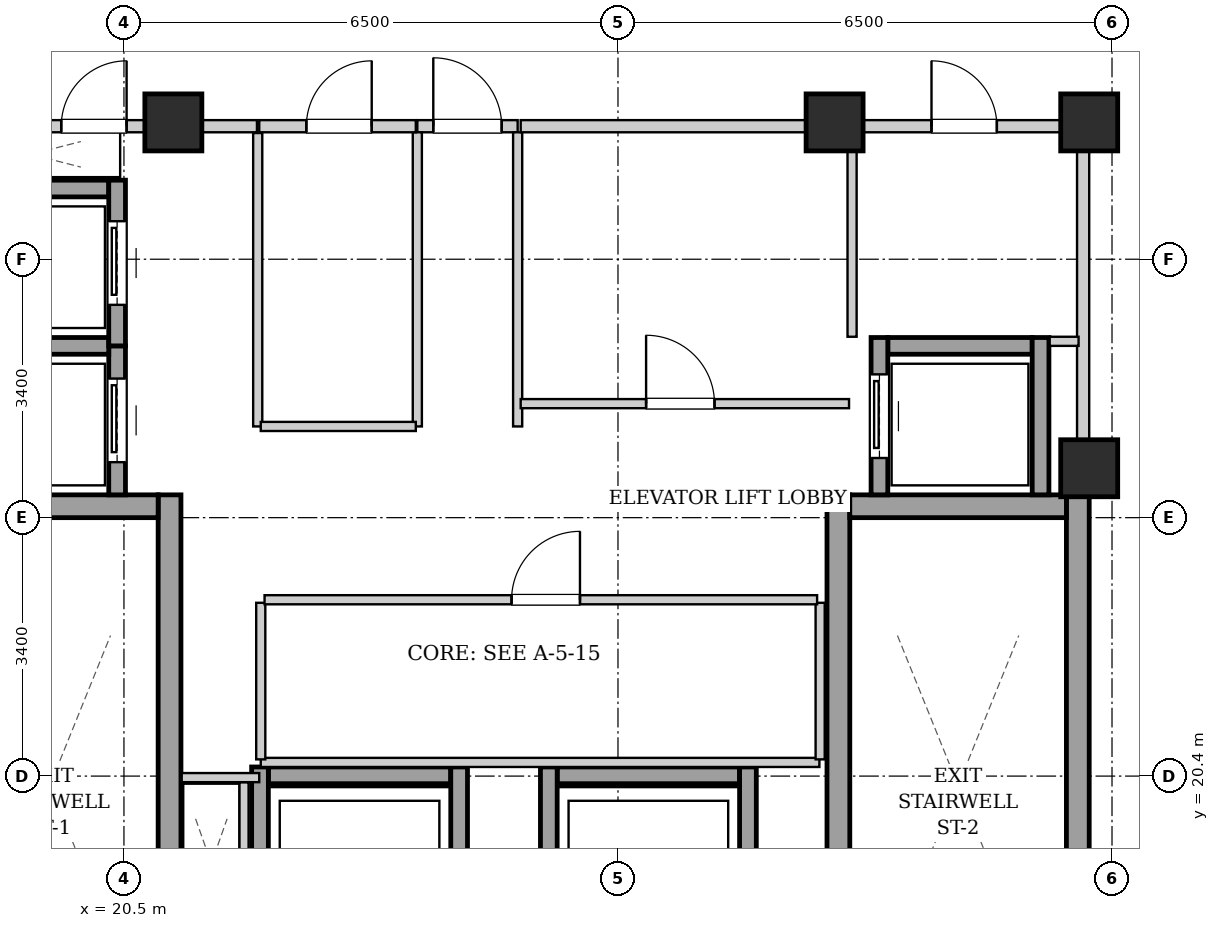
"""IFC4 building model, lengths in metres.
Left out: names, types, materials, properties, quantities, classifications, styles, units other than length and angle.
Written with IfcOpenShell. Run it as: python <this file> out.ifc"""

import sys

from ifc_helpers import new_model, si_unit, direction, frame, frame_2d, origin, origin_2d, place, context, subcontext, project, spatial, rectangle, extrude, element, fill, save


model = new_model("IFC4")
c1 = context("Model", 3, precision=1e-05, world=origin(), true_north=direction((0.0, 1.0)))
c2 = subcontext(c1, "Body", "Model", "MODEL_VIEW")
j1 = project(units=[si_unit("LENGTHUNIT", "METRE"), si_unit("PLANEANGLEUNIT", "RADIAN")], contexts=[c1])
p1 = place(None, origin())
s1 = spatial("IfcSite", under=j1, at=p1, CompositionType="ELEMENT")
p2 = place(p1, origin())
s2 = spatial("IfcBuilding", under=s1, at=p2, CompositionType="ELEMENT")
p3 = place(p2, frame((0.0, 0.0, 244.5)))
s3 = spatial("IfcBuildingStorey", under=s2, at=p3, CompositionType="ELEMENT", Elevation=244.5)
for number, where, z_axis, x_axis in (
    (1, (21.15, 29.0, 0.0), (0.0, 0.0, 1.0), (1.0, 0.0, 0.0)),
    (2, (29.85, 29.0, 0.0), (0.0, 0.0, 1.0), (1.0, 0.0, 0.0)),
    (3, (33.2, 29.0, 0.0), (0.0, 0.0, 1.0), (1.0, 0.0, 0.0)),
    (4, (33.2, 24.45, 0.0), (0.0, 0.0, 1.0), (1.0, 0.0, 0.0)),
):
    element("IfcColumn", number, at=place(p3, frame(where, z_axis=z_axis, x_axis=x_axis)), inside=s3, PredefinedType="COLUMN", context=c2, shape_type="SweptSolid", body=[
        extrude(rectangle(XDim=0.75, YDim=0.75, at=origin_2d()), origin(), (0.0, 0.0, 1.0), 3.4),
    ])
p4 = place(p3, frame((21.1, 15.1, 0.0), z_axis=(0.0, 0.0, 1.0), x_axis=(0.0, 1.0, 0.0)))
e5 = element("IfcWall", 5, at=p4, inside=s3, PredefinedType="SHEAR", context=c2, shape_type="SweptSolid", body=[
    extrude(rectangle(XDim=9.0, YDim=0.3, at=frame_2d((4.5, 0.0))), origin(), (0.0, 0.0, 1.0), 3.14),
])
p5 = place(p3, frame((18.1, 23.95, 0.0), z_axis=(0.0, 0.0, 1.0), x_axis=(1.0, 0.0, 0.0)))
e6 = element("IfcWall", 6, at=p5, inside=s3, PredefinedType="SHEAR", context=c2, shape_type="SweptSolid", body=[
    extrude(rectangle(XDim=2.85, YDim=0.3, at=frame_2d((1.425, 0.0))), origin(), (0.0, 0.0, 1.0), 3.14),
])
for number, where, z_axis, x_axis in (
    (7, (29.9, 15.1, 0.0), (0.0, 0.0, 1.0), (0.0, 1.0, 0.0)),
    (8, (33.05, 15.1, 0.0), (0.0, 0.0, 1.0), (0.0, 1.0, 0.0)),
):
    element("IfcWall", number, at=place(p3, frame(where, z_axis=z_axis, x_axis=x_axis)), inside=s3, PredefinedType="SHEAR", context=c2, shape_type="SweptSolid", body=[
        extrude(rectangle(XDim=9.0, YDim=0.3, at=frame_2d((4.5, 0.0))), origin(), (0.0, 0.0, 1.0), 3.14),
    ])
p6 = place(p3, frame((30.05, 23.95, 0.0), z_axis=(0.0, 0.0, 1.0), x_axis=(1.0, 0.0, 0.0)))
e9 = element("IfcWall", 9, at=p6, inside=s3, PredefinedType="SHEAR", context=c2, shape_type="SweptSolid", body=[
    extrude(rectangle(XDim=2.85, YDim=0.3, at=frame_2d((1.425, 0.0))), origin(), (0.0, 0.0, 1.0), 3.14),
])
p7 = place(p3, frame((20.41, 24.1, 0.0), z_axis=(0.0, 0.0, 1.0), x_axis=(0.0, 1.0, 0.0)))
e10 = element("IfcWall", 10, at=p7, inside=s3, PredefinedType="SHEAR", context=c2, shape_type="SweptSolid", body=[
    extrude(rectangle(XDim=1.96, YDim=0.22, at=frame_2d((0.98, 0.0))), origin(), (0.0, 0.0, 1.0), 3.14),
])
p8 = place(p7, frame((0.43, 0.0, 0.0)))
e11 = element("IfcOpeningElement", 11, at=p8, cuts=e10, PredefinedType="OPENING", context=c2, shape_type="SweptSolid", body=[
    extrude(rectangle(XDim=1.1, YDim=2.15, at=frame_2d((0.55, 1.075))), frame((0.0, 0.12, 0.0), z_axis=(0.0, -1.0, 0.0), x_axis=(1.0, 0.0, 0.0)), (0.0, 0.0, 1.0), 0.24),
])
for number, where, z_axis, x_axis in (
    (12, (18.4, 26.06, 0.0), (0.0, 0.0, 1.0), (1.0, 0.0, 0.0)),
    (13, (18.4, 28.13, 0.0), (0.0, 0.0, 1.0), (1.0, 0.0, 0.0)),
):
    element("IfcWall", number, at=place(p3, frame(where, z_axis=z_axis, x_axis=x_axis)), inside=s3, PredefinedType="SHEAR", context=c2, shape_type="SweptSolid", body=[
        extrude(rectangle(XDim=1.9, YDim=0.22, at=frame_2d((0.95, 0.0))), origin(), (0.0, 0.0, 1.0), 3.14),
    ])
p9 = place(p3, frame((20.41, 26.06, 0.0), z_axis=(0.0, 0.0, 1.0), x_axis=(0.0, 1.0, 0.0)))
e14 = element("IfcWall", 14, at=p9, inside=s3, PredefinedType="SHEAR", context=c2, shape_type="SweptSolid", body=[
    extrude(rectangle(XDim=2.18, YDim=0.22, at=frame_2d((1.09, 0.0))), origin(), (0.0, 0.0, 1.0), 3.14),
])
p10 = place(p9, frame((0.54, 0.0, 0.0)))
e15 = element("IfcOpeningElement", 15, at=p10, cuts=e14, PredefinedType="OPENING", context=c2, shape_type="SweptSolid", body=[
    extrude(rectangle(XDim=1.1, YDim=2.15, at=frame_2d((0.55, 1.075))), frame((0.0, 0.12, 0.0), z_axis=(0.0, -1.0, 0.0), x_axis=(1.0, 0.0, 0.0)), (0.0, 0.0, 1.0), 0.24),
])
p11 = place(p3, frame((30.55, 26.06, 0.0), z_axis=(0.0, 0.0, 1.0), x_axis=(1.0, 0.0, 0.0)))
e16 = element("IfcWall", 16, at=p11, inside=s3, PredefinedType="SHEAR", context=c2, shape_type="SweptSolid", body=[
    extrude(rectangle(XDim=1.9, YDim=0.22, at=frame_2d((0.95, 0.0))), origin(), (0.0, 0.0, 1.0), 3.14),
])
p12 = place(p3, frame((30.44, 24.1, 0.0), z_axis=(0.0, 0.0, 1.0), x_axis=(0.0, 1.0, 0.0)))
e17 = element("IfcWall", 17, at=p12, inside=s3, PredefinedType="SHEAR", context=c2, shape_type="SweptSolid", body=[
    extrude(rectangle(XDim=2.07, YDim=0.22, at=frame_2d((1.035, 0.0))), origin(), (0.0, 0.0, 1.0), 3.14),
])
p13 = place(p12, frame((0.485, 0.0, 0.0)))
e18 = element("IfcOpeningElement", 18, at=p13, cuts=e17, PredefinedType="OPENING", context=c2, shape_type="SweptSolid", body=[
    extrude(rectangle(XDim=1.1, YDim=2.15, at=frame_2d((0.55, 1.075))), frame((0.0, 0.12, 0.0), z_axis=(0.0, -1.0, 0.0), x_axis=(1.0, 0.0, 0.0)), (0.0, 0.0, 1.0), 0.24),
])
p14 = place(p3, frame((32.56, 24.1, 0.0), z_axis=(0.0, 0.0, 1.0), x_axis=(0.0, 1.0, 0.0)))
e19 = element("IfcWall", 19, at=p14, inside=s3, PredefinedType="SHEAR", context=c2, shape_type="SweptSolid", body=[
    extrude(rectangle(XDim=2.07, YDim=0.22, at=frame_2d((1.035, 0.0))), origin(), (0.0, 0.0, 1.0), 3.14),
])
p15 = place(p3, frame((22.4, 20.41, 0.0), z_axis=(0.0, 0.0, 1.0), x_axis=(1.0, 0.0, 0.0)))
e20 = element("IfcWall", 20, at=p15, inside=s3, PredefinedType="SHEAR", context=c2, shape_type="SweptSolid", body=[
    extrude(rectangle(XDim=2.4, YDim=0.22, at=frame_2d((1.2, 0.0))), origin(), (0.0, 0.0, 1.0), 3.14),
])
for number, where, z_axis, x_axis in (
    (21, (22.29, 17.98, 0.0), (0.0, 0.0, 1.0), (0.0, 1.0, 0.0)),
    (22, (24.91, 17.98, 0.0), (0.0, 0.0, 1.0), (0.0, 1.0, 0.0)),
):
    element("IfcWall", number, at=place(p3, frame(where, z_axis=z_axis, x_axis=x_axis)), inside=s3, PredefinedType="SHEAR", context=c2, shape_type="SweptSolid", body=[
        extrude(rectangle(XDim=2.54, YDim=0.22, at=frame_2d((1.27, 0.0))), origin(), (0.0, 0.0, 1.0), 3.14),
    ])
p16 = place(p3, frame((26.2, 20.41, 0.0), z_axis=(0.0, 0.0, 1.0), x_axis=(1.0, 0.0, 0.0)))
e23 = element("IfcWall", 23, at=p16, inside=s3, PredefinedType="SHEAR", context=c2, shape_type="SweptSolid", body=[
    extrude(rectangle(XDim=2.4, YDim=0.22, at=frame_2d((1.2, 0.0))), origin(), (0.0, 0.0, 1.0), 3.14),
])
for number, where, z_axis, x_axis in (
    (24, (26.09, 17.98, 0.0), (0.0, 0.0, 1.0), (0.0, 1.0, 0.0)),
    (25, (28.71, 17.98, 0.0), (0.0, 0.0, 1.0), (0.0, 1.0, 0.0)),
):
    element("IfcWall", number, at=place(p3, frame(where, z_axis=z_axis, x_axis=x_axis)), inside=s3, PredefinedType="SHEAR", context=c2, shape_type="SweptSolid", body=[
        extrude(rectangle(XDim=2.54, YDim=0.22, at=frame_2d((1.27, 0.0))), origin(), (0.0, 0.0, 1.0), 3.14),
    ])
p17 = place(p3, frame((33.12, 24.12, 0.0), z_axis=(0.0, 0.0, 1.0), x_axis=(0.0, 1.0, 0.0)))
e26 = element("IfcWall", 26, at=p17, inside=s3, PredefinedType="PARTITIONING", context=c2, shape_type="SweptSolid", body=[
    extrude(rectangle(XDim=4.76, YDim=0.16, at=frame_2d((2.38, 0.0))), origin(), (0.0, 0.0, 1.0), 3.14),
])
p18 = place(p3, frame((24.36, 28.95, 0.0), z_axis=(0.0, 0.0, 1.0), x_axis=(1.0, 0.0, 0.0)))
e27 = element("IfcWall", 27, at=p18, inside=s3, PredefinedType="PARTITIONING", context=c2, shape_type="SweptSolid", body=[
    extrude(rectangle(XDim=1.32, YDim=0.16, at=frame_2d((0.66, 0.0))), origin(), (0.0, 0.0, 1.0), 2.668),
])
p19 = place(p18, frame((0.21, 0.0, 0.0)))
e28 = element("IfcOpeningElement", 28, at=p19, cuts=e27, PredefinedType="OPENING", context=c2, shape_type="SweptSolid", body=[
    extrude(rectangle(XDim=0.9, YDim=2.05, at=frame_2d((0.45, 1.025))), frame((0.0, 0.09, 0.0), z_axis=(0.0, -1.0, 0.0), x_axis=(1.0, 0.0, 0.0)), (0.0, 0.0, 1.0), 0.18),
])
p20 = place(p3, frame((17.96, 28.95, 0.0), z_axis=(0.0, 0.0, 1.0), x_axis=(1.0, 0.0, 0.0)))
e29 = element("IfcWall", 29, at=p20, inside=s3, PredefinedType="PARTITIONING", context=c2, shape_type="SweptSolid", body=[
    extrude(rectangle(XDim=4.29, YDim=0.16, at=frame_2d((2.145, 0.0))), origin(), (0.0, 0.0, 1.0), 2.668),
])
p21 = place(p20, frame((1.715, 0.0, 0.0)))
e30 = element("IfcOpeningElement", 30, at=p21, cuts=e29, PredefinedType="OPENING", context=c2, shape_type="SweptSolid", body=[
    extrude(rectangle(XDim=0.86, YDim=2.05, at=frame_2d((0.43, 1.025))), frame((0.0, 0.09, 0.0), z_axis=(0.0, -1.0, 0.0), x_axis=(1.0, 0.0, 0.0)), (0.0, 0.0, 1.0), 0.18),
])
p22 = place(p3, frame((22.08, 18.2, 0.0), z_axis=(0.0, 0.0, 1.0), x_axis=(0.0, 1.0, 0.0)))
e31 = element("IfcWall", 31, at=p22, inside=s3, PredefinedType="PARTITIONING", context=c2, shape_type="SweptSolid", body=[
    extrude(rectangle(XDim=2.12, YDim=0.12, at=frame_2d((1.06, 0.0))), origin(), (0.0, 0.0, 1.0), 3.14),
])
p23 = place(p3, frame((22.28, 20.38, 0.0), z_axis=(0.0, 0.0, 1.0), x_axis=(-1.0, 0.0, 0.0)))
e32 = element("IfcWall", 32, at=p23, inside=s3, PredefinedType="PARTITIONING", context=c2, shape_type="SweptSolid", body=[
    extrude(rectangle(XDim=1.02, YDim=0.12, at=frame_2d((0.51, 0.0))), origin(), (0.0, 0.0, 1.0), 3.14),
])
for number, where, z_axis, x_axis in (
    (33, (24.36, 25.0, 0.0), (0.0, 0.0, 1.0), (0.0, 1.0, 0.0)),
    (34, (25.68, 25.0, 0.0), (0.0, 0.0, 1.0), (0.0, 1.0, 0.0)),
):
    element("IfcWall", number, at=place(p3, frame(where, z_axis=z_axis, x_axis=x_axis)), inside=s3, PredefinedType="PARTITIONING", context=c2, shape_type="SweptSolid", body=[
        extrude(rectangle(XDim=3.87, YDim=0.12, at=frame_2d((1.935, 0.0))), origin(), (0.0, 0.0, 1.0), 3.14),
    ])
p24 = place(p3, frame((30.08, 26.18, 0.0), z_axis=(0.0, 0.0, 1.0), x_axis=(0.0, 1.0, 0.0)))
e35 = element("IfcWall", 35, at=p24, inside=s3, PredefinedType="PARTITIONING", context=c2, shape_type="SweptSolid", body=[
    extrude(rectangle(XDim=2.68, YDim=0.12, at=frame_2d((1.34, 0.0))), origin(), (0.0, 0.0, 1.0), 3.14),
])
p25 = place(p3, frame((32.68, 26.12, 0.0), z_axis=(0.0, 0.0, 1.0), x_axis=(1.0, 0.0, 0.0)))
e36 = element("IfcWall", 36, at=p25, inside=s3, PredefinedType="PARTITIONING", context=c2, shape_type="SweptSolid", body=[
    extrude(rectangle(XDim=0.38, YDim=0.12, at=frame_2d((0.19, 0.0))), origin(), (0.0, 0.0, 1.0), 3.14),
])
p26 = place(p3, frame((30.08, 28.95, 0.0), z_axis=(0.0, 0.0, 1.0), x_axis=(1.0, 0.0, 0.0)))
e37 = element("IfcWall", 37, at=p26, inside=s3, PredefinedType="PARTITIONING", context=c2, shape_type="SweptSolid", body=[
    extrude(rectangle(XDim=2.96, YDim=0.16, at=frame_2d((1.48, 0.0))), origin(), (0.0, 0.0, 1.0), 3.14),
])
p27 = place(p26, frame((1.045, 0.0, 0.0)))
e38 = element("IfcOpeningElement", 38, at=p27, cuts=e37, PredefinedType="OPENING", context=c2, shape_type="SweptSolid", body=[
    extrude(rectangle(XDim=0.86, YDim=2.05, at=frame_2d((0.43, 1.025))), frame((0.0, 0.09, 0.0), z_axis=(0.0, -1.0, 0.0), x_axis=(1.0, 0.0, 0.0)), (0.0, 0.0, 1.0), 0.18),
])
p28 = place(p3, frame((22.26, 25.0, 0.0), z_axis=(0.0, 0.0, 1.0), x_axis=(0.0, 1.0, 0.0)))
e39 = element("IfcWall", 39, at=p28, inside=s3, PredefinedType="PARTITIONING", context=c2, shape_type="SweptSolid", body=[
    extrude(rectangle(XDim=3.86, YDim=0.12, at=frame_2d((1.93, 0.0))), origin(), (0.0, 0.0, 1.0), 3.14),
])
p29 = place(p3, frame((22.3, 25.0, 0.0), z_axis=(0.0, 0.0, 1.0), x_axis=(1.0, 0.0, 0.0)))
e40 = element("IfcWall", 40, at=p29, inside=s3, PredefinedType="PARTITIONING", context=c2, shape_type="SweptSolid", body=[
    extrude(rectangle(XDim=2.04, YDim=0.12, at=frame_2d((1.02, 0.0))), origin(), (0.0, 0.0, 1.0), 3.14),
])
p30 = place(p3, frame((22.28, 28.95, 0.0), z_axis=(0.0, 0.0, 1.0), x_axis=(1.0, 0.0, 0.0)))
e41 = element("IfcWall", 41, at=p30, inside=s3, PredefinedType="PARTITIONING", context=c2, shape_type="SweptSolid", body=[
    extrude(rectangle(XDim=2.06, YDim=0.16, at=frame_2d((1.03, 0.0))), origin(), (0.0, 0.0, 1.0), 2.668),
])
p31 = place(p30, frame((0.62, 0.0, 0.0)))
e42 = element("IfcOpeningElement", 42, at=p31, cuts=e41, PredefinedType="OPENING", context=c2, shape_type="SweptSolid", body=[
    extrude(rectangle(XDim=0.86, YDim=2.05, at=frame_2d((0.43, 1.025))), frame((0.0, 0.09, 0.0), z_axis=(0.0, -1.0, 0.0), x_axis=(1.0, 0.0, 0.0)), (0.0, 0.0, 1.0), 0.18),
])
p32 = place(p3, frame((25.72, 28.95, 0.0), z_axis=(0.0, 0.0, 1.0), x_axis=(1.0, 0.0, 0.0)))
e43 = element("IfcWall", 43, at=p32, inside=s3, PredefinedType="PARTITIONING", context=c2, shape_type="SweptSolid", body=[
    extrude(rectangle(XDim=4.32, YDim=0.16, at=frame_2d((2.16, 0.0))), origin(), (0.0, 0.0, 1.0), 2.668),
])
p33 = place(p3, frame((25.72, 25.3, 0.0), z_axis=(0.0, 0.0, 1.0), x_axis=(1.0, 0.0, 0.0)))
e44 = element("IfcWall", 44, at=p33, inside=s3, PredefinedType="PARTITIONING", context=c2, shape_type="SweptSolid", body=[
    extrude(rectangle(XDim=4.32, YDim=0.12, at=frame_2d((2.16, 0.0))), origin(), (0.0, 0.0, 1.0), 3.14),
])
p34 = place(p33, frame((1.65, 0.0, 0.0)))
e45 = element("IfcOpeningElement", 45, at=p34, cuts=e44, PredefinedType="OPENING", context=c2, shape_type="SweptSolid", body=[
    extrude(rectangle(XDim=0.9, YDim=2.05, at=frame_2d((0.45, 1.025))), frame((0.0, 0.07, 0.0), z_axis=(0.0, -1.0, 0.0), x_axis=(1.0, 0.0, 0.0)), (0.0, 0.0, 1.0), 0.14),
])
p35 = place(p3, frame((22.3, 20.58, 0.0), z_axis=(0.0, 0.0, 1.0), x_axis=(1.0, 0.0, 0.0)))
e46 = element("IfcWall", 46, at=p35, inside=s3, PredefinedType="PARTITIONING", context=c2, shape_type="SweptSolid", body=[
    extrude(rectangle(XDim=7.35, YDim=0.12, at=frame_2d((3.675, 0.0))), origin(), (0.0, 0.0, 1.0), 3.14),
])
for number, where, z_axis, x_axis in (
    (47, (22.3, 20.62, 0.0), (0.0, 0.0, 1.0), (0.0, 1.0, 0.0)),
    (48, (29.66, 20.62, 0.0), (0.0, 0.0, 1.0), (0.0, 1.0, 0.0)),
):
    element("IfcWall", number, at=place(p3, frame(where, z_axis=z_axis, x_axis=x_axis)), inside=s3, PredefinedType="PARTITIONING", context=c2, shape_type="SweptSolid", body=[
        extrude(rectangle(XDim=2.06, YDim=0.12, at=frame_2d((1.03, 0.0))), origin(), (0.0, 0.0, 1.0), 3.14),
    ])
p36 = place(p3, frame((22.35, 22.72, 0.0), z_axis=(0.0, 0.0, 1.0), x_axis=(1.0, 0.0, 0.0)))
e49 = element("IfcWall", 49, at=p36, inside=s3, PredefinedType="PARTITIONING", context=c2, shape_type="SweptSolid", body=[
    extrude(rectangle(XDim=7.27, YDim=0.12, at=frame_2d((3.635, 0.0))), origin(), (0.0, 0.0, 1.0), 3.14),
])
p37 = place(p36, frame((3.25, 0.0, 0.0)))
e50 = element("IfcOpeningElement", 50, at=p37, cuts=e49, PredefinedType="OPENING", context=c2, shape_type="SweptSolid", body=[
    extrude(rectangle(XDim=0.9, YDim=2.05, at=frame_2d((0.45, 1.025))), frame((0.0, 0.07, 0.0), z_axis=(0.0, -1.0, 0.0), x_axis=(1.0, 0.0, 0.0)), (0.0, 0.0, 1.0), 0.14),
])
p38 = place(p8, origin())
e51 = element("IfcDoor", 51, at=p38, inside=s3, OperationType="SLIDING_TO_LEFT", PredefinedType="DOOR", context=c2, shape_type="SweptSolid", body=[
    extrude(rectangle(XDim=1.1, YDim=2.15, at=frame_2d((0.55, 1.075))), frame((0.0, 0.025, 0.0), z_axis=(0.0, -1.0, 0.0), x_axis=(1.0, 0.0, 0.0)), (0.0, 0.0, 1.0), 0.05),
])
fill(e11, e51)
p39 = place(p10, origin())
e52 = element("IfcDoor", 52, at=p39, inside=s3, OperationType="SLIDING_TO_LEFT", PredefinedType="DOOR", context=c2, shape_type="SweptSolid", body=[
    extrude(rectangle(XDim=1.1, YDim=2.15, at=frame_2d((0.55, 1.075))), frame((0.0, 0.025, 0.0), z_axis=(0.0, -1.0, 0.0), x_axis=(1.0, 0.0, 0.0)), (0.0, 0.0, 1.0), 0.05),
])
fill(e15, e52)
p40 = place(p13, origin())
e53 = element("IfcDoor", 53, at=p40, inside=s3, OperationType="SLIDING_TO_LEFT", PredefinedType="DOOR", context=c2, shape_type="SweptSolid", body=[
    extrude(rectangle(XDim=1.1, YDim=2.15, at=frame_2d((0.55, 1.075))), frame((0.0, 0.025, 0.0), z_axis=(0.0, -1.0, 0.0), x_axis=(1.0, 0.0, 0.0)), (0.0, 0.0, 1.0), 0.05),
])
fill(e18, e53)
p41 = place(p19, origin())
e54 = element("IfcDoor", 54, at=p41, inside=s3, OperationType="SINGLE_SWING_LEFT", PredefinedType="DOOR", context=c2, shape_type="SweptSolid", body=[
    extrude(rectangle(XDim=0.9, YDim=2.05, at=frame_2d((0.45, 1.025))), frame((0.0, 0.025, 0.0), z_axis=(0.0, -1.0, 0.0), x_axis=(1.0, 0.0, 0.0)), (0.0, 0.0, 1.0), 0.05),
])
fill(e28, e54)
p42 = place(p21, origin())
e55 = element("IfcDoor", 55, at=p42, inside=s3, OperationType="SINGLE_SWING_RIGHT", PredefinedType="DOOR", context=c2, shape_type="SweptSolid", body=[
    extrude(rectangle(XDim=0.86, YDim=2.05, at=frame_2d((0.43, 1.025))), frame((0.0, 0.025, 0.0), z_axis=(0.0, -1.0, 0.0), x_axis=(1.0, 0.0, 0.0)), (0.0, 0.0, 1.0), 0.05),
])
fill(e30, e55)
p43 = place(p27, origin())
e56 = element("IfcDoor", 56, at=p43, inside=s3, OperationType="SINGLE_SWING_LEFT", PredefinedType="DOOR", context=c2, shape_type="SweptSolid", body=[
    extrude(rectangle(XDim=0.86, YDim=2.05, at=frame_2d((0.43, 1.025))), frame((0.0, 0.025, 0.0), z_axis=(0.0, -1.0, 0.0), x_axis=(1.0, 0.0, 0.0)), (0.0, 0.0, 1.0), 0.05),
])
fill(e38, e56)
p44 = place(p31, origin())
e57 = element("IfcDoor", 57, at=p44, inside=s3, OperationType="SINGLE_SWING_RIGHT", PredefinedType="DOOR", context=c2, shape_type="SweptSolid", body=[
    extrude(rectangle(XDim=0.86, YDim=2.05, at=frame_2d((0.43, 1.025))), frame((0.0, 0.025, 0.0), z_axis=(0.0, -1.0, 0.0), x_axis=(1.0, 0.0, 0.0)), (0.0, 0.0, 1.0), 0.05),
])
fill(e42, e57)
p45 = place(p34, origin())
e58 = element("IfcDoor", 58, at=p45, inside=s3, OperationType="SINGLE_SWING_LEFT", PredefinedType="DOOR", context=c2, shape_type="SweptSolid", body=[
    extrude(rectangle(XDim=0.9, YDim=2.05, at=frame_2d((0.45, 1.025))), frame((0.0, 0.025, 0.0), z_axis=(0.0, -1.0, 0.0), x_axis=(1.0, 0.0, 0.0)), (0.0, 0.0, 1.0), 0.05),
])
fill(e45, e58)
p46 = place(p37, origin())
e59 = element("IfcDoor", 59, at=p46, inside=s3, OperationType="SINGLE_SWING_RIGHT", PredefinedType="DOOR", context=c2, shape_type="SweptSolid", body=[
    extrude(rectangle(XDim=0.9, YDim=2.05, at=frame_2d((0.45, 1.025))), frame((0.0, 0.025, 0.0), z_axis=(0.0, -1.0, 0.0), x_axis=(1.0, 0.0, 0.0)), (0.0, 0.0, 1.0), 0.05),
])
fill(e50, e59)
save(model, sys.argv[1])
